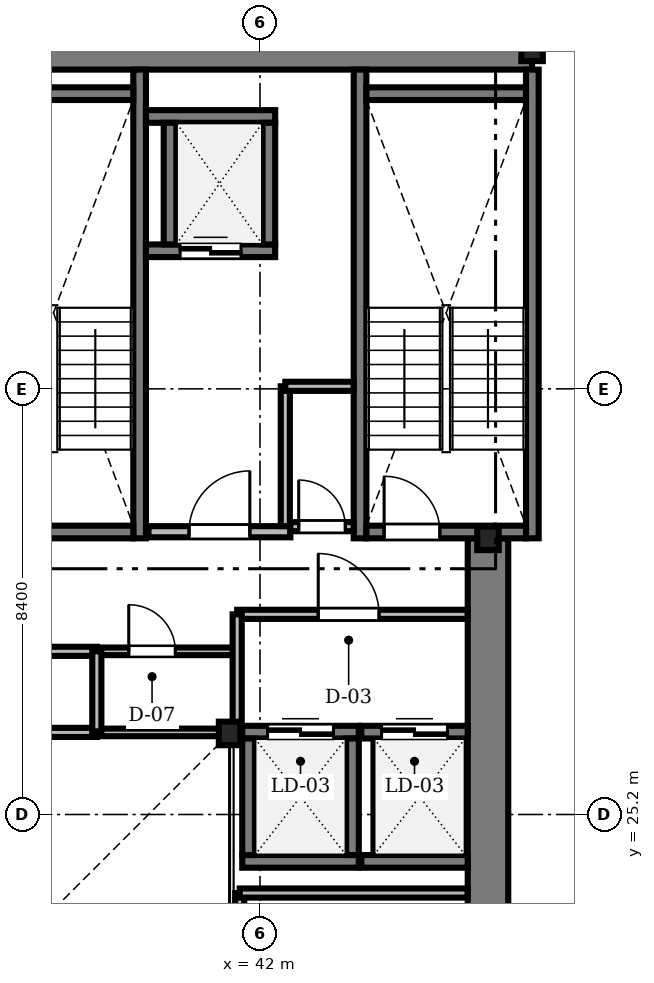
"""IFC4 building model, lengths in metres.
Left out: names, types, materials, properties, quantities, classifications, styles, units other than length and angle.
Written with IfcOpenShell. Run it as: python <this file> out.ifc"""

import sys

from ifc_helpers import new_model, si_unit, direction, frame, frame_2d, origin, origin_2d, place, context, subcontext, project, spatial, rectangle, i_section, extrude, source, transform, mapped, element, fill, save


model = new_model("IFC4")
c1 = context("Model", 3, precision=1e-05, world=origin(), true_north=direction((0.0, 1.0)))
c2 = subcontext(c1, "Body", "Model", "MODEL_VIEW")
j1 = project(units=[si_unit("LENGTHUNIT", "METRE"), si_unit("PLANEANGLEUNIT", "RADIAN")], contexts=[c1])
p1 = place(None, origin())
s1 = spatial("IfcSite", under=j1, at=p1, CompositionType="ELEMENT")
p2 = place(p1, origin())
s2 = spatial("IfcBuilding", under=s1, at=p2, CompositionType="ELEMENT")
p3 = place(p2, frame((0.0, 0.0, 118.7)))
s3 = spatial("IfcBuildingStorey", under=s2, at=p3, CompositionType="ELEMENT", Elevation=118.7)
m1 = source(origin(), c2, "Body", "SweptSolid", [
    extrude(rectangle(XDim=17.52, YDim=0.8, at=frame_2d((8.76, 0.0))), origin(), (0.0, 0.0, 1.0), 3.46),
])
p4 = place(p3, frame((29.85, 40.3, 0.0), z_axis=(0.0, 0.0, 1.0), x_axis=(1.0, 0.0, 0.0)))
e1 = element("IfcWall", 1, at=p4, inside=s3, PredefinedType="SHEAR", context=c2, shape_type="MappedRepresentation", body=[
    mapped(m1, transform((0.0, 0.0, 0.0), scale=1.0)),
])
m2 = source(origin(), c2, "Body", "SweptSolid", [
    extrude(rectangle(XDim=13.15, YDim=0.8, at=frame_2d((6.575, 0.0))), origin(), (0.0, 0.0, 1.0), 3.46),
])
p5 = place(p3, frame((46.5, 17.5, 0.0), z_axis=(0.0, 0.0, 1.0), x_axis=(0.0, 1.0, 0.0)))
e2 = element("IfcWall", 2, at=p5, inside=s3, PredefinedType="SHEAR", context=c2, shape_type="MappedRepresentation", body=[
    mapped(m2, transform((0.0, 0.0, 0.0), scale=1.0)),
])
m3 = source(origin(), c2, "Body", "SweptSolid", [
    extrude(i_section(OverallWidth=0.424, OverallDepth=0.465, WebThickness=0.035, FlangeThickness=0.056, FilletRadius=0.015, at=origin_2d()), origin(), (0.0, 0.0, 1.0), 3.46),
])
for number, where, z_axis, x_axis in (
    (3, (41.4, 26.8, 0.0), (0.0, 0.0, 1.0), (1.0, 0.0, 0.0)),
    (4, (46.5, 30.65, 0.0), (0.0, 0.0, 1.0), (1.0, 0.0, 0.0)),
    (5, (47.37, 40.3, 0.0), (0.0, 0.0, 1.0), (1.0, 0.0, 0.0)),
):
    element("IfcColumn", number, at=place(p3, frame(where, z_axis=z_axis, x_axis=x_axis)), inside=s3, PredefinedType="COLUMN", context=c2, shape_type="MappedRepresentation", body=[
        mapped(m3, transform((0.0, 0.0, 0.0), scale=1.0)),
    ])
m4 = source(origin(), c2, "Body", "SweptSolid", [
    extrude(rectangle(XDim=9.25, YDim=0.25, at=frame_2d((4.625, 0.0))), origin(), (0.0, 0.0, 1.0), 3.5),
])
p6 = place(p3, frame((39.625, 30.65, 0.0), z_axis=(0.0, 0.0, 1.0), x_axis=(0.0, 1.0, 0.0)))
e6 = element("IfcWall", 6, at=p6, inside=s3, PredefinedType="SOLIDWALL", context=c2, shape_type="MappedRepresentation", body=[
    mapped(m4, transform((0.0, 0.0, 0.0), scale=1.0)),
])
m5 = source(origin(), c2, "Body", "SweptSolid", [
    extrude(rectangle(XDim=3.15, YDim=0.25, at=frame_2d((1.575, 0.0))), origin(), (0.0, 0.0, 1.0), 3.5),
])
p7 = place(p3, frame((36.35, 39.425, 0.0), z_axis=(0.0, 0.0, 1.0), x_axis=(1.0, 0.0, 0.0)))
e7 = element("IfcWall", 7, at=p7, inside=s3, PredefinedType="SOLIDWALL", context=c2, shape_type="MappedRepresentation", body=[
    mapped(m5, transform((0.0, 0.0, 0.0), scale=1.0)),
])
p8 = place(p3, frame((36.35, 30.775, 0.0), z_axis=(0.0, 0.0, 1.0), x_axis=(1.0, 0.0, 0.0)))
e8 = element("IfcWall", 8, at=p8, inside=s3, PredefinedType="SOLIDWALL", context=c2, shape_type="MappedRepresentation", body=[
    mapped(m5, transform((0.0, 0.0, 0.0), scale=1.0)),
])
m6 = source(origin(), c2, "Body", "SweptSolid", [
    extrude(rectangle(XDim=1.1, YDim=2.2, at=frame_2d((0.55, 1.1))), frame((0.0, 0.135, 0.0), z_axis=(0.0, -1.0, 0.0), x_axis=(1.0, 0.0, 0.0)), (0.0, 0.0, 1.0), 0.27),
])
p9 = place(p8, frame((0.35, 0.0, 0.0)))
e9 = element("IfcOpeningElement", 9, at=p9, cuts=e8, PredefinedType="OPENING", context=c2, shape_type="MappedRepresentation", body=[
    mapped(m6, transform((0.0, 0.0, 0.0), scale=1.0)),
])
for number, where, z_axis, x_axis in (
    (10, (43.975, 30.65, 0.0), (0.0, 0.0, 1.0), (0.0, 1.0, 0.0)),
    (11, (47.375, 30.65, 0.0), (0.0, 0.0, 1.0), (0.0, 1.0, 0.0)),
):
    element("IfcWall", number, at=place(p3, frame(where, z_axis=z_axis, x_axis=x_axis)), inside=s3, PredefinedType="SOLIDWALL", context=c2, shape_type="MappedRepresentation", body=[
        mapped(m4, transform((0.0, 0.0, 0.0), scale=1.0)),
    ])
p10 = place(p3, frame((44.1, 39.425, 0.0), z_axis=(0.0, 0.0, 1.0), x_axis=(1.0, 0.0, 0.0)))
e12 = element("IfcWall", 12, at=p10, inside=s3, PredefinedType="SOLIDWALL", context=c2, shape_type="MappedRepresentation", body=[
    mapped(m5, transform((0.0, 0.0, 0.0), scale=1.0)),
])
p11 = place(p3, frame((44.1, 30.775, 0.0), z_axis=(0.0, 0.0, 1.0), x_axis=(1.0, 0.0, 0.0)))
e13 = element("IfcWall", 13, at=p11, inside=s3, PredefinedType="SOLIDWALL", context=c2, shape_type="MappedRepresentation", body=[
    mapped(m5, transform((0.0, 0.0, 0.0), scale=1.0)),
])
p12 = place(p11, frame((0.35, 0.0, 0.0)))
e14 = element("IfcOpeningElement", 14, at=p12, cuts=e13, PredefinedType="OPENING", context=c2, shape_type="MappedRepresentation", body=[
    mapped(m6, transform((0.0, 0.0, 0.0), scale=1.0)),
])
m7 = source(origin(), c2, "Body", "SweptSolid", [
    extrude(rectangle(XDim=2.8, YDim=0.22, at=frame_2d((1.4, 0.0))), origin(), (0.0, 0.0, 1.0), 3.46),
])
p13 = place(p3, frame((39.8, 30.78, 0.0), z_axis=(0.0, 0.0, 1.0), x_axis=(1.0, 0.0, 0.0)))
e15 = element("IfcWall", 15, at=p13, inside=s3, PredefinedType="SOLIDWALL", context=c2, shape_type="MappedRepresentation", body=[
    mapped(m7, transform((0.0, 0.0, 0.0), scale=1.0)),
])
m8 = source(origin(), c2, "Body", "SweptSolid", [
    extrude(rectangle(XDim=1.2, YDim=2.2, at=frame_2d((0.6, 1.1))), frame((0.0, 0.12, 0.0), z_axis=(0.0, -1.0, 0.0), x_axis=(1.0, 0.0, 0.0)), (0.0, 0.0, 1.0), 0.24),
])
p14 = place(p13, frame((0.8, 0.0, 0.0)))
e16 = element("IfcOpeningElement", 16, at=p14, cuts=e15, PredefinedType="OPENING", context=c2, shape_type="MappedRepresentation", body=[
    mapped(m8, transform((0.0, 0.0, 0.0), scale=1.0)),
])
m9 = source(origin(), c2, "Body", "SweptSolid", [
    extrude(rectangle(XDim=2.55, YDim=0.25, at=frame_2d((1.275, 0.0))), origin(), (0.0, 0.0, 1.0), 3.46),
])
p15 = place(p3, frame((39.75, 36.325, 0.0), z_axis=(0.0, 0.0, 1.0), x_axis=(1.0, 0.0, 0.0)))
e17 = element("IfcWall", 17, at=p15, inside=s3, PredefinedType="SOLIDWALL", context=c2, shape_type="MappedRepresentation", body=[
    mapped(m9, transform((0.0, 0.0, 0.0), scale=1.0)),
])
m10 = source(origin(), c2, "Body", "SweptSolid", [
    extrude(rectangle(XDim=1.2, YDim=2.25, at=frame_2d((0.6, 1.125))), frame((0.0, 0.135, 0.0), z_axis=(0.0, -1.0, 0.0), x_axis=(1.0, 0.0, 0.0)), (0.0, 0.0, 1.0), 0.27),
])
p16 = place(p15, frame((0.675, 0.0, 0.0)))
e18 = element("IfcOpeningElement", 18, at=p16, cuts=e17, PredefinedType="OPENING", context=c2, shape_type="MappedRepresentation", body=[
    mapped(m10, transform((0.0, 0.0, 0.0), scale=1.0)),
])
p17 = place(p3, frame((39.75, 38.975, 0.0), z_axis=(0.0, 0.0, 1.0), x_axis=(1.0, 0.0, 0.0)))
e19 = element("IfcWall", 19, at=p17, inside=s3, PredefinedType="SOLIDWALL", context=c2, shape_type="MappedRepresentation", body=[
    mapped(m9, transform((0.0, 0.0, 0.0), scale=1.0)),
])
m11 = source(origin(), c2, "Body", "SweptSolid", [
    extrude(rectangle(XDim=2.4, YDim=0.25, at=frame_2d((1.2, 0.0))), origin(), (0.0, 0.0, 1.0), 3.46),
])
for number, where, z_axis, x_axis in (
    (20, (40.225, 36.45, 0.0), (0.0, 0.0, 1.0), (0.0, 1.0, 0.0)),
    (21, (42.175, 36.45, 0.0), (0.0, 0.0, 1.0), (0.0, 1.0, 0.0)),
):
    element("IfcWall", number, at=place(p3, frame(where, z_axis=z_axis, x_axis=x_axis)), inside=s3, PredefinedType="SOLIDWALL", context=c2, shape_type="MappedRepresentation", body=[
        mapped(m11, transform((0.0, 0.0, 0.0), scale=1.0)),
    ])
m12 = source(origin(), c2, "Body", "SweptSolid", [
    extrude(rectangle(XDim=2.3, YDim=0.25, at=frame_2d((1.15, 0.0))), origin(), (0.0, 0.0, 1.0), 3.46),
])
p18 = place(p3, frame((41.65, 24.275, 0.0), z_axis=(0.0, 0.0, 1.0), x_axis=(1.0, 0.0, 0.0)))
e22 = element("IfcWall", 22, at=p18, inside=s3, PredefinedType="SOLIDWALL", context=c2, shape_type="MappedRepresentation", body=[
    mapped(m12, transform((0.0, 0.0, 0.0), scale=1.0)),
])
p19 = place(p3, frame((41.65, 26.825, 0.0), z_axis=(0.0, 0.0, 1.0), x_axis=(1.0, 0.0, 0.0)))
e23 = element("IfcWall", 23, at=p19, inside=s3, PredefinedType="SOLIDWALL", context=c2, shape_type="MappedRepresentation", body=[
    mapped(m12, transform((0.0, 0.0, 0.0), scale=1.0)),
])
m13 = source(origin(), c2, "Body", "SweptSolid", [
    extrude(rectangle(XDim=1.3, YDim=2.3, at=frame_2d((0.65, 1.15))), frame((0.0, 0.135, 0.0), z_axis=(0.0, -1.0, 0.0), x_axis=(1.0, 0.0, 0.0)), (0.0, 0.0, 1.0), 0.27),
])
p20 = place(p19, frame((0.5, 0.0, 0.0)))
e24 = element("IfcOpeningElement", 24, at=p20, cuts=e23, PredefinedType="OPENING", context=c2, shape_type="MappedRepresentation", body=[
    mapped(m13, transform((0.0, 0.0, 0.0), scale=1.0)),
])
for number, where, z_axis, x_axis in (
    (25, (41.775, 24.4, 0.0), (0.0, 0.0, 1.0), (0.0, 1.0, 0.0)),
    (26, (43.825, 24.4, 0.0), (0.0, 0.0, 1.0), (0.0, 1.0, 0.0)),
):
    element("IfcWall", number, at=place(p3, frame(where, z_axis=z_axis, x_axis=x_axis)), inside=s3, PredefinedType="SOLIDWALL", context=c2, shape_type="MappedRepresentation", body=[
        mapped(m12, transform((0.0, 0.0, 0.0), scale=1.0)),
    ])
m14 = source(origin(), c2, "Body", "SweptSolid", [
    extrude(rectangle(XDim=2.1, YDim=0.25, at=frame_2d((1.05, 0.0))), origin(), (0.0, 0.0, 1.0), 3.46),
])
p21 = place(p3, frame((44.0, 24.275, 0.0), z_axis=(0.0, 0.0, 1.0), x_axis=(1.0, 0.0, 0.0)))
e27 = element("IfcWall", 27, at=p21, inside=s3, PredefinedType="SOLIDWALL", context=c2, shape_type="MappedRepresentation", body=[
    mapped(m14, transform((0.0, 0.0, 0.0), scale=1.0)),
])
p22 = place(p3, frame((44.0, 26.825, 0.0), z_axis=(0.0, 0.0, 1.0), x_axis=(1.0, 0.0, 0.0)))
e28 = element("IfcWall", 28, at=p22, inside=s3, PredefinedType="SOLIDWALL", context=c2, shape_type="MappedRepresentation", body=[
    mapped(m14, transform((0.0, 0.0, 0.0), scale=1.0)),
])
p23 = place(p22, frame((0.4, 0.0, 0.0)))
e29 = element("IfcOpeningElement", 29, at=p23, cuts=e28, PredefinedType="OPENING", context=c2, shape_type="MappedRepresentation", body=[
    mapped(m13, transform((0.0, 0.0, 0.0), scale=1.0)),
])
m15 = source(origin(), c2, "Body", "SweptSolid", [
    extrude(rectangle(XDim=7.33, YDim=0.18, at=frame_2d((3.665, 0.0))), origin(), (0.0, 0.0, 1.0), 3.092),
])
p24 = place(p3, frame((31.45, 28.42, 0.0), z_axis=(0.0, 0.0, 1.0), x_axis=(1.0, 0.0, 0.0)))
e30 = element("IfcWall", 30, at=p24, inside=s3, PredefinedType="PARTITIONING", context=c2, shape_type="MappedRepresentation", body=[
    mapped(m15, transform((0.0, 0.0, 0.0), scale=1.0)),
])
m16 = source(origin(), c2, "Body", "SweptSolid", [
    extrude(rectangle(XDim=0.95, YDim=2.15, at=frame_2d((0.475, 1.075))), frame((0.0, 0.1, 0.0), z_axis=(0.0, -1.0, 0.0), x_axis=(1.0, 0.0, 0.0)), (0.0, 0.0, 1.0), 0.2),
])
p25 = place(p24, frame((0.65, 0.0, 0.0)))
e31 = element("IfcOpeningElement", 31, at=p25, cuts=e30, PredefinedType="OPENING", context=c2, shape_type="MappedRepresentation", body=[
    mapped(m16, transform((0.0, 0.0, 0.0), scale=1.0)),
])
m17 = source(origin(), c2, "Body", "SweptSolid", [
    extrude(rectangle(XDim=4.548, YDim=0.18, at=frame_2d((2.274, 0.0))), origin(), (0.0, 0.0, 1.0), 3.092),
])
p26 = place(p3, frame((41.55, 29.15, 0.0), z_axis=(0.0, 0.0, 1.0), x_axis=(1.0, 0.0, 0.0)))
e32 = element("IfcWall", 32, at=p26, inside=s3, PredefinedType="PARTITIONING", context=c2, shape_type="MappedRepresentation", body=[
    mapped(m17, transform((0.0, 0.0, 0.0), scale=1.0)),
])
m18 = source(origin(), c2, "Body", "SweptSolid", [
    extrude(rectangle(XDim=1.2, YDim=2.2, at=frame_2d((0.6, 1.1))), frame((0.0, 0.1, 0.0), z_axis=(0.0, -1.0, 0.0), x_axis=(1.0, 0.0, 0.0)), (0.0, 0.0, 1.0), 0.2),
])
p27 = place(p26, frame((1.6, 0.0, 0.0)))
e33 = element("IfcOpeningElement", 33, at=p27, cuts=e32, PredefinedType="OPENING", context=c2, shape_type="MappedRepresentation", body=[
    mapped(m18, transform((0.0, 0.0, 0.0), scale=1.0)),
])
m19 = source(origin(), c2, "Body", "SweptSolid", [
    extrude(rectangle(XDim=2.74, YDim=0.15, at=frame_2d((1.37, 0.0))), origin(), (0.0, 0.0, 1.0), 3.46),
])
p28 = place(p3, frame((38.78, 28.42, 0.0), z_axis=(0.0, 0.0, 1.0), x_axis=(1.0, 0.0, 0.0)))
e34 = element("IfcWall", 34, at=p28, inside=s3, PredefinedType="PARTITIONING", context=c2, shape_type="MappedRepresentation", body=[
    mapped(m19, transform((0.0, 0.0, 0.0), scale=1.0)),
])
m20 = source(origin(), c2, "Body", "SweptSolid", [
    extrude(rectangle(XDim=0.92, YDim=2.1, at=frame_2d((0.46, 1.05))), frame((0.0, 0.085, 0.0), z_axis=(0.0, -1.0, 0.0), x_axis=(1.0, 0.0, 0.0)), (0.0, 0.0, 1.0), 0.17),
])
p29 = place(p28, frame((0.63, 0.0, 0.0)))
e35 = element("IfcOpeningElement", 35, at=p29, cuts=e34, PredefinedType="OPENING", context=c2, shape_type="MappedRepresentation", body=[
    mapped(m20, transform((0.0, 0.0, 0.0), scale=1.0)),
])
m21 = source(origin(), c2, "Body", "SweptSolid", [
    extrude(rectangle(XDim=1.248, YDim=0.18, at=frame_2d((0.624, 0.0))), origin(), (0.0, 0.0, 1.0), 3.46),
])
p30 = place(p3, frame((42.6, 30.88, 0.0), z_axis=(0.0, 0.0, 1.0), x_axis=(1.0, 0.0, 0.0)))
e36 = element("IfcWall", 36, at=p30, inside=s3, PredefinedType="PARTITIONING", context=c2, shape_type="MappedRepresentation", body=[
    mapped(m21, transform((0.0, 0.0, 0.0), scale=1.0)),
])
m22 = source(origin(), c2, "Body", "SweptSolid", [
    extrude(rectangle(XDim=0.92, YDim=2.1, at=frame_2d((0.46, 1.05))), frame((0.0, 0.1, 0.0), z_axis=(0.0, -1.0, 0.0), x_axis=(1.0, 0.0, 0.0)), (0.0, 0.0, 1.0), 0.2),
])
p31 = place(p30, frame((0.164, 0.0, 0.0)))
e37 = element("IfcOpeningElement", 37, at=p31, cuts=e36, PredefinedType="OPENING", context=c2, shape_type="MappedRepresentation", body=[
    mapped(m22, transform((0.0, 0.0, 0.0), scale=1.0)),
])
m23 = source(origin(), c2, "Body", "SweptSolid", [
    extrude(rectangle(XDim=7.33, YDim=0.18, at=frame_2d((3.665, 0.0))), origin(), (0.0, 0.0, 1.0), 3.002),
])
p32 = place(p3, frame((31.45, 26.82, 0.0), z_axis=(0.0, 0.0, 1.0), x_axis=(1.0, 0.0, 0.0)))
e38 = element("IfcWall", 38, at=p32, inside=s3, PredefinedType="PARTITIONING", context=c2, shape_type="MappedRepresentation", body=[
    mapped(m23, transform((0.0, 0.0, 0.0), scale=1.0)),
])
m24 = source(origin(), c2, "Body", "SweptSolid", [
    extrude(rectangle(XDim=7.15, YDim=0.18, at=frame_2d((3.575, 0.0))), origin(), (0.0, 0.0, 1.0), 2.852),
])
p33 = place(p3, frame((41.6, 16.5, 0.0), z_axis=(0.0, 0.0, 1.0), x_axis=(0.0, 1.0, 0.0)))
e39 = element("IfcWall", 39, at=p33, inside=s3, PredefinedType="PARTITIONING", context=c2, shape_type="MappedRepresentation", body=[
    mapped(m24, transform((0.0, 0.0, 0.0), scale=1.0)),
])
m25 = source(origin(), c2, "Body", "SweptSolid", [
    extrude(rectangle(XDim=4.498, YDim=0.18, at=frame_2d((2.249, 0.0))), origin(), (0.0, 0.0, 1.0), 3.46),
])
p34 = place(p3, frame((41.6, 23.65, 0.0), z_axis=(0.0, 0.0, 1.0), x_axis=(1.0, 0.0, 0.0)))
e40 = element("IfcWall", 40, at=p34, inside=s3, PredefinedType="PARTITIONING", context=c2, shape_type="MappedRepresentation", body=[
    mapped(m25, transform((0.0, 0.0, 0.0), scale=1.0)),
])
m26 = source(origin(), c2, "Body", "SweptSolid", [
    extrude(rectangle(XDim=2.758, YDim=0.18, at=frame_2d((1.379, 0.0))), origin(), (0.0, 0.0, 1.0), 3.46),
])
p35 = place(p3, frame((42.5, 30.892, 0.0), z_axis=(0.0, 0.0, 1.0), x_axis=(0.0, 1.0, 0.0)))
e41 = element("IfcWall", 41, at=p35, inside=s3, PredefinedType="PARTITIONING", context=c2, shape_type="MappedRepresentation", body=[
    mapped(m26, transform((0.0, 0.0, 0.0), scale=1.0)),
])
m27 = source(origin(), c2, "Body", "SweptSolid", [
    extrude(rectangle(XDim=2.74, YDim=0.15, at=frame_2d((1.37, 0.0))), origin(), (0.0, 0.0, 1.0), 2.852),
])
p36 = place(p3, frame((38.78, 26.82, 0.0), z_axis=(0.0, 0.0, 1.0), x_axis=(1.0, 0.0, 0.0)))
e42 = element("IfcWall", 42, at=p36, inside=s3, PredefinedType="PARTITIONING", context=c2, shape_type="MappedRepresentation", body=[
    mapped(m27, transform((0.0, 0.0, 0.0), scale=1.0)),
])
m28 = source(origin(), c2, "Body", "SweptSolid", [
    extrude(rectangle(XDim=2.35, YDim=0.18, at=frame_2d((1.175, 0.0))), origin(), (0.0, 0.0, 1.0), 2.852),
])
p37 = place(p3, frame((41.55, 26.8, 0.0), z_axis=(0.0, 0.0, 1.0), x_axis=(0.0, 1.0, 0.0)))
e43 = element("IfcWall", 43, at=p37, inside=s3, PredefinedType="PARTITIONING", context=c2, shape_type="MappedRepresentation", body=[
    mapped(m28, transform((0.0, 0.0, 0.0), scale=1.0)),
])
m29 = source(origin(), c2, "Body", "SweptSolid", [
    extrude(rectangle(XDim=1.6, YDim=0.18, at=frame_2d((0.8, 0.0))), origin(), (0.0, 0.0, 1.0), 3.002),
])
p38 = place(p3, frame((38.78, 26.82, 0.0), z_axis=(0.0, 0.0, 1.0), x_axis=(0.0, 1.0, 0.0)))
e44 = element("IfcWall", 44, at=p38, inside=s3, PredefinedType="PARTITIONING", context=c2, shape_type="MappedRepresentation", body=[
    mapped(m29, transform((0.0, 0.0, 0.0), scale=1.0)),
])
m30 = source(origin(), c2, "Body", "SweptSolid", [
    extrude(rectangle(XDim=1.348, YDim=0.18, at=frame_2d((0.674, 0.0))), origin(), (0.0, 0.0, 1.0), 3.46),
])
p39 = place(p3, frame((42.5, 33.65, 0.0), z_axis=(0.0, 0.0, 1.0), x_axis=(1.0, 0.0, 0.0)))
e45 = element("IfcWall", 45, at=p39, inside=s3, PredefinedType="PARTITIONING", context=c2, shape_type="MappedRepresentation", body=[
    mapped(m30, transform((0.0, 0.0, 0.0), scale=1.0)),
])
m31 = source(origin(), c2, "Body", "SweptSolid", [
    extrude(rectangle(XDim=1.1, YDim=2.2, at=frame_2d((0.55, 1.1))), frame((0.0, 0.025, 0.0), z_axis=(0.0, -1.0, 0.0), x_axis=(1.0, 0.0, 0.0)), (0.0, 0.0, 1.0), 0.05),
])
p40 = place(p12, origin())
e46 = element("IfcDoor", 46, at=p40, inside=s3, OperationType="SINGLE_SWING_LEFT", PredefinedType="DOOR", context=c2, shape_type="MappedRepresentation", body=[
    mapped(m31, transform((0.0, 0.0, 0.0), scale=1.0)),
])
fill(e14, e46)
m32 = source(origin(), c2, "Body", "SweptSolid", [
    extrude(rectangle(XDim=1.2, YDim=2.2, at=frame_2d((0.6, 1.1))), frame((0.0, 0.025, 0.0), z_axis=(0.0, -1.0, 0.0), x_axis=(1.0, 0.0, 0.0)), (0.0, 0.0, 1.0), 0.05),
])
p41 = place(p14, origin())
e47 = element("IfcDoor", 47, at=p41, inside=s3, OperationType="SINGLE_SWING_RIGHT", PredefinedType="DOOR", context=c2, shape_type="MappedRepresentation", body=[
    mapped(m32, transform((0.0, 0.0, 0.0), scale=1.0)),
])
fill(e16, e47)
m33 = source(origin(), c2, "Body", "SweptSolid", [
    extrude(rectangle(XDim=1.2, YDim=2.25, at=frame_2d((0.6, 1.125))), frame((0.0, 0.025, 0.0), z_axis=(0.0, -1.0, 0.0), x_axis=(1.0, 0.0, 0.0)), (0.0, 0.0, 1.0), 0.05),
])
p42 = place(p16, origin())
e48 = element("IfcDoor", 48, at=p42, inside=s3, OperationType="DOUBLE_DOOR_SLIDING", PredefinedType="DOOR", context=c2, shape_type="MappedRepresentation", body=[
    mapped(m33, transform((0.0, 0.0, 0.0), scale=1.0)),
])
fill(e18, e48)
m34 = source(origin(), c2, "Body", "SweptSolid", [
    extrude(rectangle(XDim=1.3, YDim=2.3, at=frame_2d((0.65, 1.15))), frame((0.0, 0.025, 0.0), z_axis=(0.0, -1.0, 0.0), x_axis=(1.0, 0.0, 0.0)), (0.0, 0.0, 1.0), 0.05),
])
p43 = place(p20, origin())
e49 = element("IfcDoor", 49, at=p43, inside=s3, OperationType="DOUBLE_DOOR_SLIDING", PredefinedType="DOOR", context=c2, shape_type="MappedRepresentation", body=[
    mapped(m34, transform((0.0, 0.0, 0.0), scale=1.0)),
])
fill(e24, e49)
p44 = place(p23, origin())
e50 = element("IfcDoor", 50, at=p44, inside=s3, OperationType="DOUBLE_DOOR_SLIDING", PredefinedType="DOOR", context=c2, shape_type="MappedRepresentation", body=[
    mapped(m34, transform((0.0, 0.0, 0.0), scale=1.0)),
])
fill(e29, e50)
p45 = place(p27, origin())
e51 = element("IfcDoor", 51, at=p45, inside=s3, OperationType="SINGLE_SWING_LEFT", PredefinedType="DOOR", context=c2, shape_type="MappedRepresentation", body=[
    mapped(m32, transform((0.0, 0.0, 0.0), scale=1.0)),
])
fill(e33, e51)
m35 = source(origin(), c2, "Body", "SweptSolid", [
    extrude(rectangle(XDim=0.92, YDim=2.1, at=frame_2d((0.46, 1.05))), frame((0.0, 0.025, 0.0), z_axis=(0.0, -1.0, 0.0), x_axis=(1.0, 0.0, 0.0)), (0.0, 0.0, 1.0), 0.05),
])
p46 = place(p29, origin())
e52 = element("IfcDoor", 52, at=p46, inside=s3, OperationType="SINGLE_SWING_LEFT", PredefinedType="DOOR", context=c2, shape_type="MappedRepresentation", body=[
    mapped(m35, transform((0.0, 0.0, 0.0), scale=1.0)),
])
fill(e35, e52)
p47 = place(p31, origin())
e53 = element("IfcDoor", 53, at=p47, inside=s3, OperationType="SINGLE_SWING_LEFT", PredefinedType="DOOR", context=c2, shape_type="MappedRepresentation", body=[
    mapped(m35, transform((0.0, 0.0, 0.0), scale=1.0)),
])
fill(e37, e53)
save(model, sys.argv[1])
